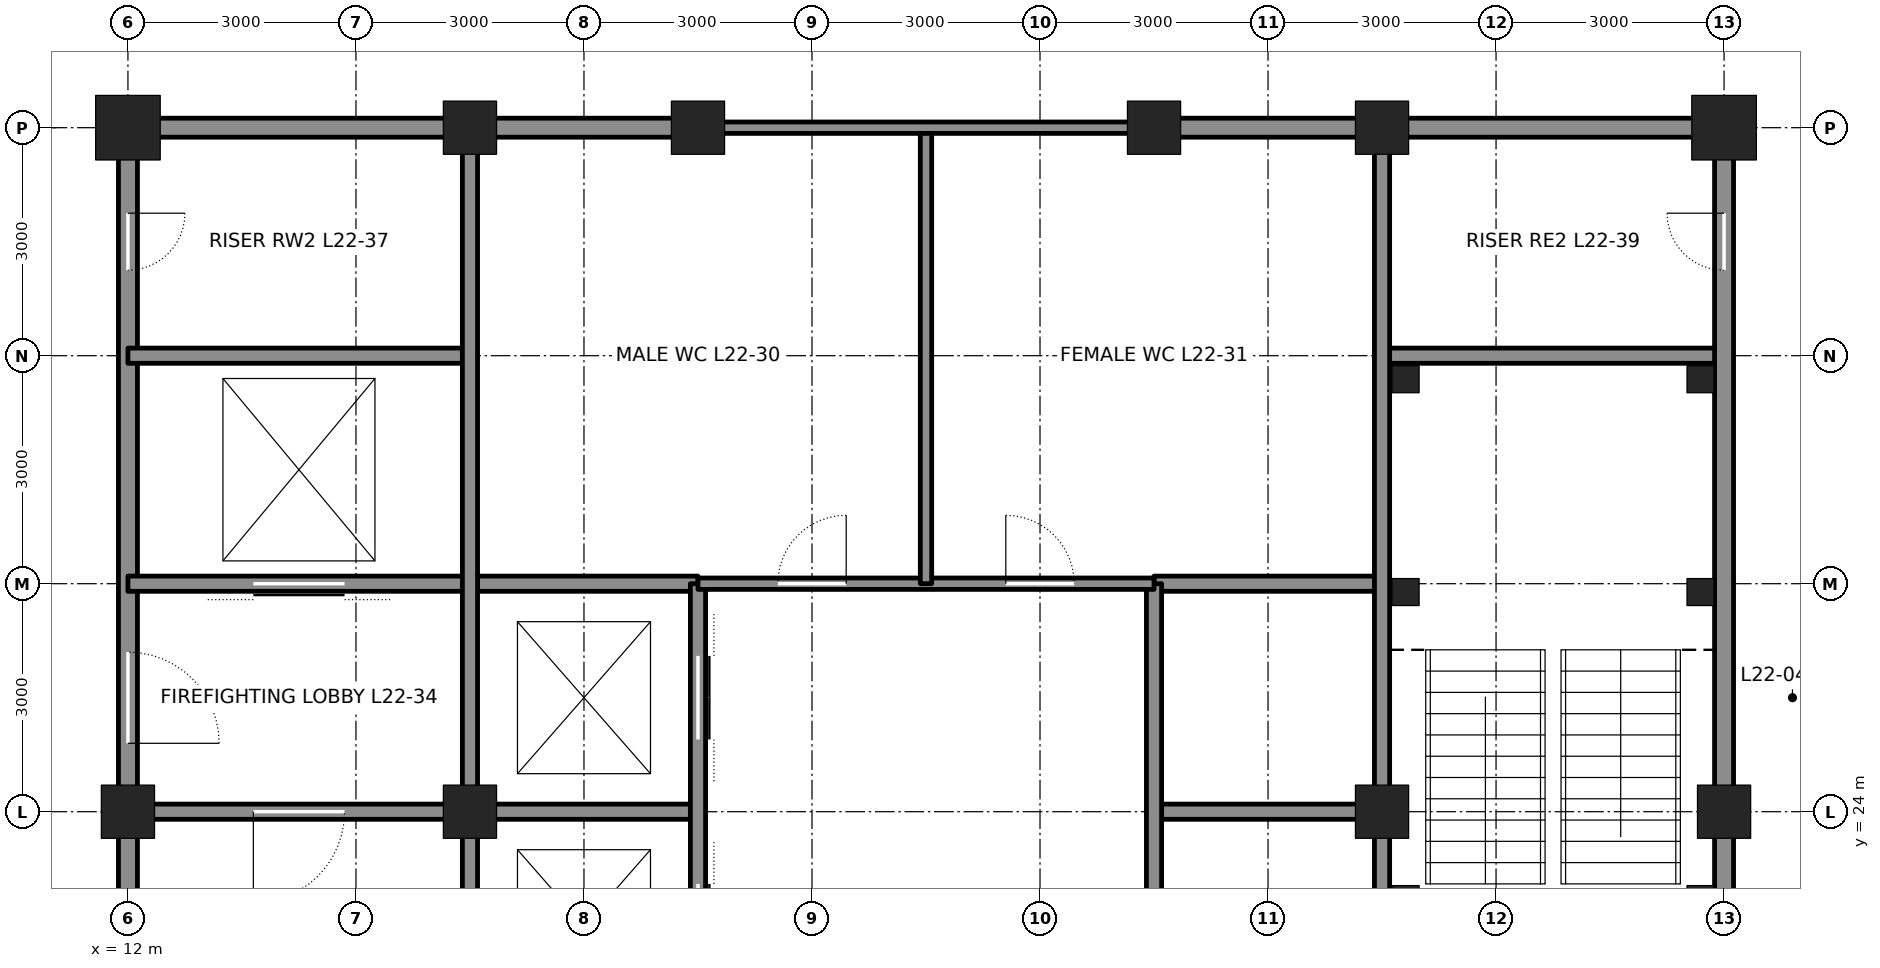
"""IFC4 building model, lengths in metres.
Left out: names, types, materials, properties, quantities, classifications, styles, units other than length and angle.
Written with IfcOpenShell. Run it as: python <this file> out.ifc"""

import sys

from ifc_helpers import new_model, si_unit, direction, frame, frame_2d, origin, origin_2d, place, context, subcontext, project, spatial, rectangle, hollow_rectangle, extrude, element, fill, save


model = new_model("IFC4")
c1 = context("Model", 3, precision=1e-05, world=origin(), true_north=direction((0.0, 1.0)))
c2 = subcontext(c1, "Body", "Model", "MODEL_VIEW")
j1 = project(units=[si_unit("LENGTHUNIT", "METRE"), si_unit("PLANEANGLEUNIT", "RADIAN")], contexts=[c1])
p1 = place(None, origin())
s1 = spatial("IfcSite", under=j1, at=p1, CompositionType="ELEMENT")
p2 = place(p1, origin())
s2 = spatial("IfcBuilding", under=s1, at=p2, CompositionType="ELEMENT")
p3 = place(p2, frame((0.0, 0.0, 106.8)))
s3 = spatial("IfcBuildingStorey", under=s2, at=p3, CompositionType="ELEMENT", Elevation=106.8)
p4 = place(p3, frame((12.0, 33.0, 0.0), z_axis=(0.0, 0.0, 1.0), x_axis=(1.0, 0.0, 0.0)))
e1 = element("IfcColumn", 1, at=p4, inside=s3, PredefinedType="COLUMN", context=c2, shape_type="SweptSolid", body=[
    extrude(hollow_rectangle(XDim=0.85, YDim=0.85, WallThickness=0.085, at=origin_2d()), origin(), (0.0, 0.0, 1.0), 4.2),
])
for number, where, z_axis, x_axis in (
    (2, (16.5, 33.0, 0.0), (0.0, 0.0, 1.0), (1.0, 0.0, 0.0)),
    (3, (19.5, 33.0, 0.0), (0.0, 0.0, 1.0), (1.0, 0.0, 0.0)),
    (4, (25.5, 33.0, 0.0), (0.0, 0.0, 1.0), (1.0, 0.0, 0.0)),
    (5, (28.5, 33.0, 0.0), (0.0, 0.0, 1.0), (1.0, 0.0, 0.0)),
):
    element("IfcColumn", number, at=place(p3, frame(where, z_axis=z_axis, x_axis=x_axis)), inside=s3, PredefinedType="COLUMN", context=c2, shape_type="SweptSolid", body=[
        extrude(hollow_rectangle(XDim=0.7, YDim=0.7, WallThickness=0.07, at=origin_2d()), origin(), (0.0, 0.0, 1.0), 4.2),
    ])
p5 = place(p3, frame((33.0, 33.0, 0.0), z_axis=(0.0, 0.0, 1.0), x_axis=(1.0, 0.0, 0.0)))
e6 = element("IfcColumn", 6, at=p5, inside=s3, PredefinedType="COLUMN", context=c2, shape_type="SweptSolid", body=[
    extrude(hollow_rectangle(XDim=0.85, YDim=0.85, WallThickness=0.085, at=origin_2d()), origin(), (0.0, 0.0, 1.0), 4.2),
])
for number, where, z_axis, x_axis in (
    (7, (12.0, 24.0, 0.0), (0.0, 0.0, 1.0), (1.0, 0.0, 0.0)),
    (8, (33.0, 24.0, 0.0), (0.0, 0.0, 1.0), (1.0, 0.0, 0.0)),
    (9, (16.5, 24.0, 0.0), (0.0, 0.0, 1.0), (1.0, 0.0, 0.0)),
    (10, (28.5, 24.0, 0.0), (0.0, 0.0, 1.0), (1.0, 0.0, 0.0)),
):
    element("IfcColumn", number, at=place(p3, frame(where, z_axis=z_axis, x_axis=x_axis)), inside=s3, PredefinedType="COLUMN", context=c2, shape_type="SweptSolid", body=[
        extrude(hollow_rectangle(XDim=0.7, YDim=0.7, WallThickness=0.07, at=origin_2d()), origin(), (0.0, 0.0, 1.0), 4.2),
    ])
p6 = place(p3, frame((12.0, 21.25, 0.0), z_axis=(0.0, 0.0, 1.0), x_axis=(0.0, 1.0, 0.0)))
e11 = element("IfcWall", 11, at=p6, inside=s3, PredefinedType="SOLIDWALL", context=c2, shape_type="SweptSolid", body=[
    extrude(rectangle(XDim=2.5, YDim=0.25, at=frame_2d((1.25, 0.0))), origin(), (0.0, 0.0, 1.0), 3.113),
])
p7 = place(p3, frame((12.0, 24.25, 0.0), z_axis=(0.0, 0.0, 1.0), x_axis=(0.0, 1.0, 0.0)))
e12 = element("IfcWall", 12, at=p7, inside=s3, PredefinedType="SOLIDWALL", context=c2, shape_type="SweptSolid", body=[
    extrude(rectangle(XDim=8.5, YDim=0.25, at=frame_2d((4.25, 0.0))), origin(), (0.0, 0.0, 1.0), 3.113),
])
p8 = place(p7, frame((0.65, 0.0, 0.0)))
e13 = element("IfcOpeningElement", 13, at=p8, cuts=e12, PredefinedType="OPENING", context=c2, shape_type="SweptSolid", body=[
    extrude(rectangle(XDim=1.2, YDim=2.1, at=frame_2d((0.6, 1.05))), frame((0.0, 0.135, 0.0), z_axis=(0.0, -1.0, 0.0), x_axis=(1.0, 0.0, 0.0)), (0.0, 0.0, 1.0), 0.27),
])
p9 = place(p7, frame((6.875, 0.0, 0.0)))
e14 = element("IfcOpeningElement", 14, at=p9, cuts=e12, PredefinedType="OPENING", context=c2, shape_type="SweptSolid", body=[
    extrude(rectangle(XDim=0.75, YDim=2.1, at=frame_2d((0.375, 1.05))), frame((0.0, 0.135, 0.0), z_axis=(0.0, -1.0, 0.0), x_axis=(1.0, 0.0, 0.0)), (0.0, 0.0, 1.0), 0.27),
])
p10 = place(p3, frame((12.25, 24.0, 0.0), z_axis=(0.0, 0.0, 1.0), x_axis=(1.0, 0.0, 0.0)))
e15 = element("IfcWall", 15, at=p10, inside=s3, PredefinedType="SOLIDWALL", context=c2, shape_type="SweptSolid", body=[
    extrude(rectangle(XDim=4.0, YDim=0.2, at=frame_2d((2.0, 0.0))), origin(), (0.0, 0.0, 1.0), 3.09),
])
p11 = place(p10, frame((1.4, 0.0, 0.0)))
e16 = element("IfcOpeningElement", 16, at=p11, cuts=e15, PredefinedType="OPENING", context=c2, shape_type="SweptSolid", body=[
    extrude(rectangle(XDim=1.2, YDim=2.1, at=frame_2d((0.6, 1.05))), frame((0.0, 0.11, 0.0), z_axis=(0.0, -1.0, 0.0), x_axis=(1.0, 0.0, 0.0)), (0.0, 0.0, 1.0), 0.22),
])
for number, where, z_axis, x_axis in (
    (17, (16.75, 24.0, 0.0), (0.0, 0.0, 1.0), (1.0, 0.0, 0.0)),
    (18, (25.5, 24.0, 0.0), (0.0, 0.0, 1.0), (1.0, 0.0, 0.0)),
):
    element("IfcWall", number, at=place(p3, frame(where, z_axis=z_axis, x_axis=x_axis)), inside=s3, PredefinedType="SOLIDWALL", context=c2, shape_type="SweptSolid", body=[
        extrude(rectangle(XDim=2.75, YDim=0.2, at=frame_2d((1.375, 0.0))), origin(), (0.0, 0.0, 1.0), 3.09),
    ])
p12 = place(p3, frame((12.0, 27.0, 0.0), z_axis=(0.0, 0.0, 1.0), x_axis=(1.0, 0.0, 0.0)))
e19 = element("IfcWall", 19, at=p12, inside=s3, PredefinedType="SOLIDWALL", context=c2, shape_type="SweptSolid", body=[
    extrude(rectangle(XDim=7.5, YDim=0.2, at=frame_2d((3.75, 0.0))), origin(), (0.0, 0.0, 1.0), 4.04),
])
p13 = place(p12, frame((1.65, 0.0, 0.0)))
e20 = element("IfcOpeningElement", 20, at=p13, cuts=e19, PredefinedType="OPENING", context=c2, shape_type="SweptSolid", body=[
    extrude(rectangle(XDim=1.2, YDim=2.1, at=frame_2d((0.6, 1.05))), frame((0.0, 0.11, 0.0), z_axis=(0.0, -1.0, 0.0), x_axis=(1.0, 0.0, 0.0)), (0.0, 0.0, 1.0), 0.22),
])
p14 = place(p3, frame((25.5, 27.0, 0.0), z_axis=(0.0, 0.0, 1.0), x_axis=(1.0, 0.0, 0.0)))
e21 = element("IfcWall", 21, at=p14, inside=s3, PredefinedType="SOLIDWALL", context=c2, shape_type="SweptSolid", body=[
    extrude(rectangle(XDim=3.0, YDim=0.2, at=frame_2d((1.5, 0.0))), origin(), (0.0, 0.0, 1.0), 4.04),
])
for number, where, z_axis, x_axis in (
    (22, (12.0, 30.0, 0.0), (0.0, 0.0, 1.0), (1.0, 0.0, 0.0)),
    (23, (28.5, 30.0, 0.0), (0.0, 0.0, 1.0), (1.0, 0.0, 0.0)),
):
    element("IfcWall", number, at=place(p3, frame(where, z_axis=z_axis, x_axis=x_axis)), inside=s3, PredefinedType="SOLIDWALL", context=c2, shape_type="SweptSolid", body=[
        extrude(rectangle(XDim=4.5, YDim=0.2, at=frame_2d((2.25, 0.0))), origin(), (0.0, 0.0, 1.0), 4.04),
    ])
p15 = place(p3, frame((12.25, 33.0, 0.0), z_axis=(0.0, 0.0, 1.0), x_axis=(1.0, 0.0, 0.0)))
e24 = element("IfcWall", 24, at=p15, inside=s3, PredefinedType="SOLIDWALL", context=c2, shape_type="SweptSolid", body=[
    extrude(rectangle(XDim=4.0, YDim=0.25, at=frame_2d((2.0, 0.0))), origin(), (0.0, 0.0, 1.0), 3.181),
])
for number, where, z_axis, x_axis in (
    (25, (16.75, 33.0, 0.0), (0.0, 0.0, 1.0), (1.0, 0.0, 0.0)),
    (26, (25.75, 33.0, 0.0), (0.0, 0.0, 1.0), (1.0, 0.0, 0.0)),
):
    element("IfcWall", number, at=place(p3, frame(where, z_axis=z_axis, x_axis=x_axis)), inside=s3, PredefinedType="SOLIDWALL", context=c2, shape_type="SweptSolid", body=[
        extrude(rectangle(XDim=2.5, YDim=0.25, at=frame_2d((1.25, 0.0))), origin(), (0.0, 0.0, 1.0), 3.181),
    ])
p16 = place(p3, frame((28.75, 33.0, 0.0), z_axis=(0.0, 0.0, 1.0), x_axis=(1.0, 0.0, 0.0)))
e27 = element("IfcWall", 27, at=p16, inside=s3, PredefinedType="SOLIDWALL", context=c2, shape_type="SweptSolid", body=[
    extrude(rectangle(XDim=4.0, YDim=0.25, at=frame_2d((2.0, 0.0))), origin(), (0.0, 0.0, 1.0), 3.181),
])
p17 = place(p3, frame((16.5, 21.25, 0.0), z_axis=(0.0, 0.0, 1.0), x_axis=(0.0, 1.0, 0.0)))
e28 = element("IfcWall", 28, at=p17, inside=s3, PredefinedType="SOLIDWALL", context=c2, shape_type="SweptSolid", body=[
    extrude(rectangle(XDim=2.5, YDim=0.2, at=frame_2d((1.25, 0.0))), origin(), (0.0, 0.0, 1.0), 3.113),
])
p18 = place(p3, frame((16.5, 24.25, 0.0), z_axis=(0.0, 0.0, 1.0), x_axis=(0.0, 1.0, 0.0)))
e29 = element("IfcWall", 29, at=p18, inside=s3, PredefinedType="SOLIDWALL", context=c2, shape_type="SweptSolid", body=[
    extrude(rectangle(XDim=8.5, YDim=0.2, at=frame_2d((4.25, 0.0))), origin(), (0.0, 0.0, 1.0), 3.113),
])
p19 = place(p3, frame((19.5, 15.0, 0.0), z_axis=(0.0, 0.0, 1.0), x_axis=(0.0, 1.0, 0.0)))
e30 = element("IfcWall", 30, at=p19, inside=s3, PredefinedType="SOLIDWALL", context=c2, shape_type="SweptSolid", body=[
    extrude(rectangle(XDim=12.0, YDim=0.2, at=frame_2d((6.0, 0.0))), origin(), (0.0, 0.0, 1.0), 3.064),
])
p20 = place(p19, frame((0.95, 0.0, 0.0)))
e31 = element("IfcOpeningElement", 31, at=p20, cuts=e30, PredefinedType="OPENING", context=c2, shape_type="SweptSolid", body=[
    extrude(rectangle(XDim=1.1, YDim=2.1, at=frame_2d((0.55, 1.05))), frame((0.0, 0.11, 0.0), z_axis=(0.0, -1.0, 0.0), x_axis=(1.0, 0.0, 0.0)), (0.0, 0.0, 1.0), 0.22),
])
p21 = place(p19, frame((3.95, 0.0, 0.0)))
e32 = element("IfcOpeningElement", 32, at=p21, cuts=e30, PredefinedType="OPENING", context=c2, shape_type="SweptSolid", body=[
    extrude(rectangle(XDim=1.1, YDim=2.1, at=frame_2d((0.55, 1.05))), frame((0.0, 0.11, 0.0), z_axis=(0.0, -1.0, 0.0), x_axis=(1.0, 0.0, 0.0)), (0.0, 0.0, 1.0), 0.22),
])
p22 = place(p19, frame((6.95, 0.0, 0.0)))
e33 = element("IfcOpeningElement", 33, at=p22, cuts=e30, PredefinedType="OPENING", context=c2, shape_type="SweptSolid", body=[
    extrude(rectangle(XDim=1.1, YDim=2.1, at=frame_2d((0.55, 1.05))), frame((0.0, 0.11, 0.0), z_axis=(0.0, -1.0, 0.0), x_axis=(1.0, 0.0, 0.0)), (0.0, 0.0, 1.0), 0.22),
])
p23 = place(p19, frame((9.95, 0.0, 0.0)))
e34 = element("IfcOpeningElement", 34, at=p23, cuts=e30, PredefinedType="OPENING", context=c2, shape_type="SweptSolid", body=[
    extrude(rectangle(XDim=1.1, YDim=2.1, at=frame_2d((0.55, 1.05))), frame((0.0, 0.11, 0.0), z_axis=(0.0, -1.0, 0.0), x_axis=(1.0, 0.0, 0.0)), (0.0, 0.0, 1.0), 0.22),
])
p24 = place(p3, frame((25.5, 15.0, 0.0), z_axis=(0.0, 0.0, 1.0), x_axis=(0.0, 1.0, 0.0)))
e35 = element("IfcWall", 35, at=p24, inside=s3, PredefinedType="SOLIDWALL", context=c2, shape_type="SweptSolid", body=[
    extrude(rectangle(XDim=12.0, YDim=0.2, at=frame_2d((6.0, 0.0))), origin(), (0.0, 0.0, 1.0), 3.064),
])
p25 = place(p3, frame((28.5, 21.25, 0.0), z_axis=(0.0, 0.0, 1.0), x_axis=(0.0, 1.0, 0.0)))
e36 = element("IfcWall", 36, at=p25, inside=s3, PredefinedType="SOLIDWALL", context=c2, shape_type="SweptSolid", body=[
    extrude(rectangle(XDim=2.5, YDim=0.2, at=frame_2d((1.25, 0.0))), origin(), (0.0, 0.0, 1.0), 3.113),
])
p26 = place(p3, frame((28.5, 24.25, 0.0), z_axis=(0.0, 0.0, 1.0), x_axis=(0.0, 1.0, 0.0)))
e37 = element("IfcWall", 37, at=p26, inside=s3, PredefinedType="SOLIDWALL", context=c2, shape_type="SweptSolid", body=[
    extrude(rectangle(XDim=8.5, YDim=0.2, at=frame_2d((4.25, 0.0))), origin(), (0.0, 0.0, 1.0), 3.113),
])
p27 = place(p3, frame((33.0, 21.25, 0.0), z_axis=(0.0, 0.0, 1.0), x_axis=(0.0, 1.0, 0.0)))
e38 = element("IfcWall", 38, at=p27, inside=s3, PredefinedType="SOLIDWALL", context=c2, shape_type="SweptSolid", body=[
    extrude(rectangle(XDim=2.5, YDim=0.25, at=frame_2d((1.25, 0.0))), origin(), (0.0, 0.0, 1.0), 3.113),
])
p28 = place(p3, frame((33.0, 24.25, 0.0), z_axis=(0.0, 0.0, 1.0), x_axis=(0.0, 1.0, 0.0)))
e39 = element("IfcWall", 39, at=p28, inside=s3, PredefinedType="SOLIDWALL", context=c2, shape_type="SweptSolid", body=[
    extrude(rectangle(XDim=8.5, YDim=0.25, at=frame_2d((4.25, 0.0))), origin(), (0.0, 0.0, 1.0), 3.113),
])
p29 = place(p28, frame((6.875, 0.0, 0.0)))
e40 = element("IfcOpeningElement", 40, at=p29, cuts=e39, PredefinedType="OPENING", context=c2, shape_type="SweptSolid", body=[
    extrude(rectangle(XDim=0.75, YDim=2.1, at=frame_2d((0.375, 1.05))), frame((0.0, 0.135, 0.0), z_axis=(0.0, -1.0, 0.0), x_axis=(1.0, 0.0, 0.0)), (0.0, 0.0, 1.0), 0.27),
])
p30 = place(p3, frame((19.5, 27.0, 0.0), z_axis=(0.0, 0.0, 1.0), x_axis=(1.0, 0.0, 0.0)))
e41 = element("IfcWall", 41, at=p30, inside=s3, PredefinedType="PARTITIONING", context=c2, shape_type="SweptSolid", body=[
    extrude(rectangle(XDim=6.0, YDim=0.15, at=frame_2d((3.0, 0.0))), origin(), (0.0, 0.0, 1.0), 4.04),
])
p31 = place(p30, frame((1.05, 0.0, 0.0)))
e42 = element("IfcOpeningElement", 42, at=p31, cuts=e41, PredefinedType="OPENING", context=c2, shape_type="SweptSolid", body=[
    extrude(rectangle(XDim=0.9, YDim=2.1, at=frame_2d((0.45, 1.05))), frame((0.0, 0.085, 0.0), z_axis=(0.0, -1.0, 0.0), x_axis=(1.0, 0.0, 0.0)), (0.0, 0.0, 1.0), 0.17),
])
p32 = place(p30, frame((4.05, 0.0, 0.0)))
e43 = element("IfcOpeningElement", 43, at=p32, cuts=e41, PredefinedType="OPENING", context=c2, shape_type="SweptSolid", body=[
    extrude(rectangle(XDim=0.9, YDim=2.1, at=frame_2d((0.45, 1.05))), frame((0.0, 0.085, 0.0), z_axis=(0.0, -1.0, 0.0), x_axis=(1.0, 0.0, 0.0)), (0.0, 0.0, 1.0), 0.17),
])
p33 = place(p3, frame((22.5, 27.0, 0.0), z_axis=(0.0, 0.0, 1.0), x_axis=(0.0, 1.0, 0.0)))
e44 = element("IfcWall", 44, at=p33, inside=s3, PredefinedType="PARTITIONING", context=c2, shape_type="SweptSolid", body=[
    extrude(rectangle(XDim=6.0, YDim=0.15, at=frame_2d((3.0, 0.0))), origin(), (0.0, 0.0, 1.0), 4.04),
])
p34 = place(p3, frame((19.5, 33.0, 0.0), z_axis=(0.0, 0.0, 1.0), x_axis=(1.0, 0.0, 0.0)))
e45 = element("IfcWall", 45, at=p34, inside=s3, PredefinedType="PARTITIONING", context=c2, shape_type="SweptSolid", body=[
    extrude(rectangle(XDim=6.0, YDim=0.15, at=frame_2d((3.0, 0.0))), origin(), (0.0, 0.0, 1.0), 3.181),
])
for number, where, z_axis, x_axis in (
    (46, (28.81, 29.69, 0.0), (0.0, 0.0, 1.0), (1.0, 0.0, 0.0)),
    (47, (32.69, 29.69, 0.0), (0.0, 0.0, 1.0), (1.0, 0.0, 0.0)),
    (48, (28.81, 26.89, 0.0), (0.0, 0.0, 1.0), (1.0, 0.0, 0.0)),
    (49, (32.69, 26.89, 0.0), (0.0, 0.0, 1.0), (1.0, 0.0, 0.0)),
    (50, (28.81, 22.85, 0.0), (0.0, 0.0, 1.0), (1.0, 0.0, 0.0)),
    (51, (32.69, 22.85, 0.0), (0.0, 0.0, 1.0), (1.0, 0.0, 0.0)),
):
    element("IfcColumn", number, at=place(p3, frame(where, z_axis=z_axis, x_axis=x_axis)), inside=s3, PredefinedType="COLUMN", context=c2, shape_type="SweptSolid", body=[
        extrude(hollow_rectangle(XDim=0.356, YDim=0.356, WallThickness=0.015, at=origin_2d()), origin(), (0.0, 0.0, 1.0), 4.2),
    ])
p35 = place(p11, frame((1.2, 0.0, 0.0), z_axis=(0.0, 0.0, 1.0), x_axis=(-1.0, 0.0, 0.0)))
e52 = element("IfcDoor", 52, at=p35, inside=s3, OperationType="SINGLE_SWING_RIGHT", PredefinedType="DOOR", context=c2, shape_type="SweptSolid", body=[
    extrude(rectangle(XDim=1.2, YDim=2.1, at=frame_2d((0.6, 1.05))), frame((0.0, 0.025, 0.0), z_axis=(0.0, -1.0, 0.0), x_axis=(1.0, 0.0, 0.0)), (0.0, 0.0, 1.0), 0.05),
])
fill(e16, e52)
p36 = place(p8, frame((1.2, 0.0, 0.0), z_axis=(0.0, 0.0, 1.0), x_axis=(-1.0, 0.0, 0.0)))
e53 = element("IfcDoor", 53, at=p36, inside=s3, OperationType="SINGLE_SWING_RIGHT", PredefinedType="DOOR", context=c2, shape_type="SweptSolid", body=[
    extrude(rectangle(XDim=1.2, YDim=2.1, at=frame_2d((0.6, 1.05))), frame((0.0, 0.025, 0.0), z_axis=(0.0, -1.0, 0.0), x_axis=(1.0, 0.0, 0.0)), (0.0, 0.0, 1.0), 0.05),
])
fill(e13, e53)
p37 = place(p13, origin())
e54 = element("IfcDoor", 54, at=p37, inside=s3, OperationType="DOUBLE_DOOR_SLIDING", PredefinedType="DOOR", context=c2, shape_type="SweptSolid", body=[
    extrude(rectangle(XDim=1.2, YDim=2.1, at=frame_2d((0.6, 1.05))), frame((0.0, 0.025, 0.0), z_axis=(0.0, -1.0, 0.0), x_axis=(1.0, 0.0, 0.0)), (0.0, 0.0, 1.0), 0.05),
])
fill(e20, e54)
p38 = place(p9, frame((0.75, 0.0, 0.0), z_axis=(0.0, 0.0, 1.0), x_axis=(-1.0, 0.0, 0.0)))
e55 = element("IfcDoor", 55, at=p38, inside=s3, OperationType="SINGLE_SWING_LEFT", PredefinedType="DOOR", context=c2, shape_type="SweptSolid", body=[
    extrude(rectangle(XDim=0.75, YDim=2.1, at=frame_2d((0.375, 1.05))), frame((0.0, 0.025, 0.0), z_axis=(0.0, -1.0, 0.0), x_axis=(1.0, 0.0, 0.0)), (0.0, 0.0, 1.0), 0.05),
])
fill(e14, e55)
p39 = place(p29, origin())
e56 = element("IfcDoor", 56, at=p39, inside=s3, OperationType="SINGLE_SWING_RIGHT", PredefinedType="DOOR", context=c2, shape_type="SweptSolid", body=[
    extrude(rectangle(XDim=0.75, YDim=2.1, at=frame_2d((0.375, 1.05))), frame((0.0, 0.025, 0.0), z_axis=(0.0, -1.0, 0.0), x_axis=(1.0, 0.0, 0.0)), (0.0, 0.0, 1.0), 0.05),
])
fill(e40, e56)
p40 = place(p31, origin())
e57 = element("IfcDoor", 57, at=p40, inside=s3, OperationType="SINGLE_SWING_RIGHT", PredefinedType="DOOR", context=c2, shape_type="SweptSolid", body=[
    extrude(rectangle(XDim=0.9, YDim=2.1, at=frame_2d((0.45, 1.05))), frame((0.0, 0.025, 0.0), z_axis=(0.0, -1.0, 0.0), x_axis=(1.0, 0.0, 0.0)), (0.0, 0.0, 1.0), 0.05),
])
fill(e42, e57)
p41 = place(p32, origin())
e58 = element("IfcDoor", 58, at=p41, inside=s3, OperationType="SINGLE_SWING_LEFT", PredefinedType="DOOR", context=c2, shape_type="SweptSolid", body=[
    extrude(rectangle(XDim=0.9, YDim=2.1, at=frame_2d((0.45, 1.05))), frame((0.0, 0.025, 0.0), z_axis=(0.0, -1.0, 0.0), x_axis=(1.0, 0.0, 0.0)), (0.0, 0.0, 1.0), 0.05),
])
fill(e43, e58)
p42 = place(p22, origin())
e59 = element("IfcDoor", 59, at=p42, inside=s3, OperationType="DOUBLE_DOOR_SLIDING", PredefinedType="DOOR", context=c2, shape_type="SweptSolid", body=[
    extrude(rectangle(XDim=1.1, YDim=2.1, at=frame_2d((0.55, 1.05))), frame((0.0, 0.025, 0.0), z_axis=(0.0, -1.0, 0.0), x_axis=(1.0, 0.0, 0.0)), (0.0, 0.0, 1.0), 0.05),
])
fill(e33, e59)
p43 = place(p23, origin())
e60 = element("IfcDoor", 60, at=p43, inside=s3, OperationType="DOUBLE_DOOR_SLIDING", PredefinedType="DOOR", context=c2, shape_type="SweptSolid", body=[
    extrude(rectangle(XDim=1.1, YDim=2.1, at=frame_2d((0.55, 1.05))), frame((0.0, 0.025, 0.0), z_axis=(0.0, -1.0, 0.0), x_axis=(1.0, 0.0, 0.0)), (0.0, 0.0, 1.0), 0.05),
])
fill(e34, e60)
save(model, sys.argv[1])
